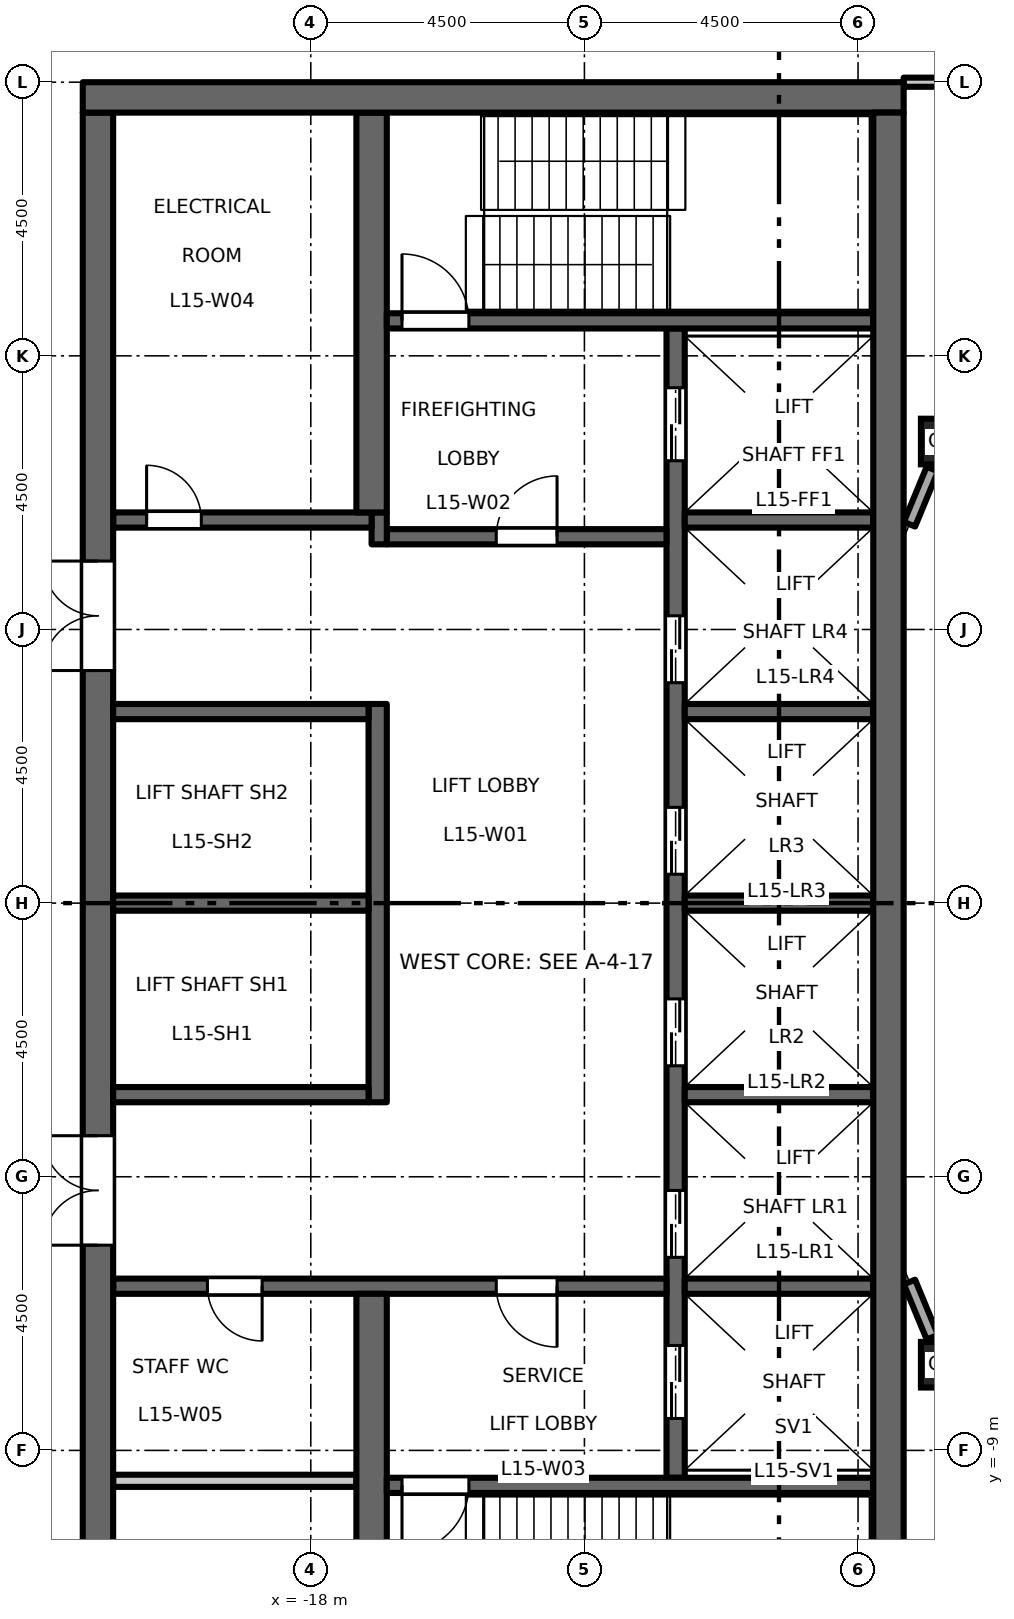
"""IFC4 building model, lengths in metres.
Left out: names, types, materials, properties, quantities, classifications, styles, units other than length and angle.
Written with IfcOpenShell. Run it as: python <this file> out.ifc"""

import sys

from ifc_helpers import new_model, si_unit, direction, frame, frame_2d, origin, origin_2d, place, context, subcontext, project, spatial, rectangle, hollow_rectangle, extrude, element, fill, save


model = new_model("IFC4")
c1 = context("Model", 3, precision=1e-05, world=origin(), true_north=direction((0.0, 1.0)))
c2 = subcontext(c1, "Body", "Model", "MODEL_VIEW")
j1 = project(units=[si_unit("LENGTHUNIT", "METRE"), si_unit("PLANEANGLEUNIT", "RADIAN")], contexts=[c1])
p1 = place(None, origin())
s1 = spatial("IfcSite", under=j1, at=p1, CompositionType="ELEMENT")
p2 = place(p1, origin())
s2 = spatial("IfcBuilding", under=s1, at=p2, CompositionType="ELEMENT")
p3 = place(p2, frame((0.0, 0.0, 71.7)))
s3 = spatial("IfcBuildingStorey", under=s2, at=p3, CompositionType="ELEMENT", Elevation=71.7)
for number, where, z_axis, x_axis in (
    (1, (-7.591, -7.591, 0.0), (0.0, 0.0, 1.0), (1.0, 0.0, 0.0)),
    (2, (-7.591, 7.591, 0.0), (0.0, 0.0, 1.0), (1.0, 0.0, 0.0)),
):
    element("IfcColumn", number, at=place(p3, frame(where, z_axis=z_axis, x_axis=x_axis)), inside=s3, PredefinedType="COLUMN", context=c2, shape_type="SweptSolid", body=[
        extrude(hollow_rectangle(XDim=0.75, YDim=0.75, WallThickness=0.045, at=origin_2d()), origin(), (0.0, 0.0, 1.0), 4.5),
    ])
p4 = place(p3, frame((-12.0, -9.45, 0.0), z_axis=(0.0, 0.0, 1.0), x_axis=(0.0, 1.0, 0.0)))
e3 = element("IfcWall", 3, at=p4, inside=s3, PredefinedType="SHEAR", context=c2, shape_type="SweptSolid", body=[
    extrude(rectangle(XDim=18.9, YDim=0.3, at=frame_2d((9.45, 0.0))), origin(), (0.0, 0.0, 1.0), 4.35),
])
p5 = place(p4, frame((3.625, 0.0, 0.0)))
e4 = element("IfcOpeningElement", 4, at=p5, cuts=e3, PredefinedType="OPENING", context=c2, shape_type="SweptSolid", body=[
    extrude(rectangle(XDim=1.1, YDim=2.1, at=frame_2d((0.55, 1.05))), frame((0.0, 0.16, 0.0), z_axis=(0.0, -1.0, 0.0), x_axis=(1.0, 0.0, 0.0)), (0.0, 0.0, 1.0), 0.32),
])
p6 = place(p4, frame((6.775, 0.0, 0.0)))
e5 = element("IfcOpeningElement", 5, at=p6, cuts=e3, PredefinedType="OPENING", context=c2, shape_type="SweptSolid", body=[
    extrude(rectangle(XDim=1.1, YDim=2.1, at=frame_2d((0.55, 1.05))), frame((0.0, 0.16, 0.0), z_axis=(0.0, -1.0, 0.0), x_axis=(1.0, 0.0, 0.0)), (0.0, 0.0, 1.0), 0.32),
])
p7 = place(p4, frame((9.925, 0.0, 0.0)))
e6 = element("IfcOpeningElement", 6, at=p7, cuts=e3, PredefinedType="OPENING", context=c2, shape_type="SweptSolid", body=[
    extrude(rectangle(XDim=1.1, YDim=2.1, at=frame_2d((0.55, 1.05))), frame((0.0, 0.16, 0.0), z_axis=(0.0, -1.0, 0.0), x_axis=(1.0, 0.0, 0.0)), (0.0, 0.0, 1.0), 0.32),
])
p8 = place(p4, frame((13.075, 0.0, 0.0)))
e7 = element("IfcOpeningElement", 7, at=p8, cuts=e3, PredefinedType="OPENING", context=c2, shape_type="SweptSolid", body=[
    extrude(rectangle(XDim=1.1, YDim=2.1, at=frame_2d((0.55, 1.05))), frame((0.0, 0.16, 0.0), z_axis=(0.0, -1.0, 0.0), x_axis=(1.0, 0.0, 0.0)), (0.0, 0.0, 1.0), 0.32),
])
p9 = place(p4, frame((16.725, 0.0, 0.0)))
e8 = element("IfcOpeningElement", 8, at=p9, cuts=e3, PredefinedType="OPENING", context=c2, shape_type="SweptSolid", body=[
    extrude(rectangle(XDim=1.2, YDim=2.1, at=frame_2d((0.6, 1.05))), frame((0.0, 0.16, 0.0), z_axis=(0.0, -1.0, 0.0), x_axis=(1.0, 0.0, 0.0)), (0.0, 0.0, 1.0), 0.32),
])
p10 = place(p4, frame((0.975, 0.0, 0.0)))
e9 = element("IfcOpeningElement", 9, at=p10, cuts=e3, PredefinedType="OPENING", context=c2, shape_type="SweptSolid", body=[
    extrude(rectangle(XDim=1.2, YDim=2.1, at=frame_2d((0.6, 1.05))), frame((0.0, 0.16, 0.0), z_axis=(0.0, -1.0, 0.0), x_axis=(1.0, 0.0, 0.0)), (0.0, 0.0, 1.0), 0.32),
])
p11 = place(p3, frame((-12.15, 6.025, 0.0), z_axis=(0.0, 0.0, 1.0), x_axis=(-1.0, 0.0, 0.0)))
e10 = element("IfcWall", 10, at=p11, inside=s3, PredefinedType="SHEAR", context=c2, shape_type="SweptSolid", body=[
    extrude(rectangle(XDim=4.6, YDim=0.25, at=frame_2d((2.3, 0.0))), origin(), (0.0, 0.0, 1.0), 4.35),
])
p12 = place(p11, frame((1.8, 0.0, 0.0)))
e11 = element("IfcOpeningElement", 11, at=p12, cuts=e10, PredefinedType="OPENING", context=c2, shape_type="SweptSolid", body=[
    extrude(rectangle(XDim=1.0, YDim=2.1, at=frame_2d((0.5, 1.05))), frame((0.0, 0.135, 0.0), z_axis=(0.0, -1.0, 0.0), x_axis=(1.0, 0.0, 0.0)), (0.0, 0.0, 1.0), 0.27),
])
p13 = place(p3, frame((-16.875, 5.9, 0.0), z_axis=(0.0, 0.0, 1.0), x_axis=(0.0, 1.0, 0.0)))
e12 = element("IfcWall", 12, at=p13, inside=s3, PredefinedType="SHEAR", context=c2, shape_type="SweptSolid", body=[
    extrude(rectangle(XDim=0.525, YDim=0.25, at=frame_2d((0.263, 0.0))), origin(), (0.0, 0.0, 1.0), 4.35),
])
p14 = place(p3, frame((-17.0, 6.3, 0.0), z_axis=(0.0, 0.0, 1.0), x_axis=(-1.0, 0.0, 0.0)))
e13 = element("IfcWall", 13, at=p14, inside=s3, PredefinedType="SHEAR", context=c2, shape_type="SweptSolid", body=[
    extrude(rectangle(XDim=4.25, YDim=0.25, at=frame_2d((2.125, 0.0))), origin(), (0.0, 0.0, 1.0), 4.35),
])
p15 = place(p14, frame((2.8, 0.0, 0.0)))
e14 = element("IfcOpeningElement", 14, at=p15, cuts=e13, PredefinedType="OPENING", context=c2, shape_type="SweptSolid", body=[
    extrude(rectangle(XDim=0.9, YDim=2.1, at=frame_2d((0.45, 1.05))), frame((0.0, 0.135, 0.0), z_axis=(0.0, -1.0, 0.0), x_axis=(1.0, 0.0, 0.0)), (0.0, 0.0, 1.0), 0.27),
])
p16 = place(p3, frame((-12.15, -6.3, 0.0), z_axis=(0.0, 0.0, 1.0), x_axis=(-1.0, 0.0, 0.0)))
e15 = element("IfcWall", 15, at=p16, inside=s3, PredefinedType="SHEAR", context=c2, shape_type="SweptSolid", body=[
    extrude(rectangle(XDim=9.1, YDim=0.25, at=frame_2d((4.55, 0.0))), origin(), (0.0, 0.0, 1.0), 4.35),
])
p17 = place(p16, frame((1.8, 0.0, 0.0)))
e16 = element("IfcOpeningElement", 16, at=p17, cuts=e15, PredefinedType="OPENING", context=c2, shape_type="SweptSolid", body=[
    extrude(rectangle(XDim=1.0, YDim=2.1, at=frame_2d((0.5, 1.05))), frame((0.0, 0.135, 0.0), z_axis=(0.0, -1.0, 0.0), x_axis=(1.0, 0.0, 0.0)), (0.0, 0.0, 1.0), 0.27),
])
p18 = place(p16, frame((6.65, 0.0, 0.0)))
e17 = element("IfcOpeningElement", 17, at=p18, cuts=e15, PredefinedType="OPENING", context=c2, shape_type="SweptSolid", body=[
    extrude(rectangle(XDim=0.9, YDim=2.1, at=frame_2d((0.45, 1.05))), frame((0.0, 0.135, 0.0), z_axis=(0.0, -1.0, 0.0), x_axis=(1.0, 0.0, 0.0)), (0.0, 0.0, 1.0), 0.27),
])
p19 = place(p3, frame((-21.5, -13.0, 0.0), z_axis=(0.0, 0.0, 1.0), x_axis=(0.0, 1.0, 0.0)))
e18 = element("IfcWall", 18, at=p19, inside=s3, PredefinedType="SHEAR", context=c2, shape_type="SweptSolid", body=[
    extrude(rectangle(XDim=26.0, YDim=0.5, at=frame_2d((13.0, 0.0))), origin(), (0.0, 0.0, 1.0), 4.35),
])
p20 = place(p19, frame((16.825, 0.0, 0.0)))
e19 = element("IfcOpeningElement", 19, at=p20, cuts=e18, PredefinedType="OPENING", context=c2, shape_type="SweptSolid", body=[
    extrude(rectangle(XDim=1.8, YDim=2.1, at=frame_2d((0.9, 1.05))), frame((0.0, 0.26, 0.0), z_axis=(0.0, -1.0, 0.0), x_axis=(1.0, 0.0, 0.0)), (0.0, 0.0, 1.0), 0.52),
])
p21 = place(p19, frame((7.375, 0.0, 0.0)))
e20 = element("IfcOpeningElement", 20, at=p21, cuts=e18, PredefinedType="OPENING", context=c2, shape_type="SweptSolid", body=[
    extrude(rectangle(XDim=1.8, YDim=2.1, at=frame_2d((0.9, 1.05))), frame((0.0, 0.26, 0.0), z_axis=(0.0, -1.0, 0.0), x_axis=(1.0, 0.0, 0.0)), (0.0, 0.0, 1.0), 0.52),
])
p22 = place(p19, frame((1.3, 0.0, 0.0)))
e21 = element("IfcOpeningElement", 21, at=p22, cuts=e18, PredefinedType="OPENING", context=c2, shape_type="SweptSolid", body=[
    extrude(rectangle(XDim=0.9, YDim=2.1, at=frame_2d((0.45, 1.05))), frame((0.0, 0.26, 0.0), z_axis=(0.0, -1.0, 0.0), x_axis=(1.0, 0.0, 0.0)), (0.0, 0.0, 1.0), 0.52),
])
p23 = place(p3, frame((-17.25, -9.5, 0.0), z_axis=(0.0, 0.0, 1.0), x_axis=(-1.0, 0.0, 0.0)))
e22 = element("IfcWall", 22, at=p23, inside=s3, PredefinedType="PARTITIONING", context=c2, shape_type="SweptSolid", body=[
    extrude(rectangle(XDim=4.0, YDim=0.2, at=frame_2d((2.0, 0.0))), origin(), (0.0, 0.0, 1.0), 4.35),
])
p24 = place(p3, frame((-16.9, -3.275, 0.0), z_axis=(0.0, 0.0, 1.0), x_axis=(0.0, 1.0, 0.0)))
e23 = element("IfcWall", 23, at=p24, inside=s3, PredefinedType="SHEAR", context=c2, shape_type="SweptSolid", body=[
    extrude(rectangle(XDim=6.55, YDim=0.3, at=frame_2d((3.275, 0.0))), origin(), (0.0, 0.0, 1.0), 4.35),
])
for number, where, z_axis, x_axis in (
    (24, (-17.05, 0.0, 0.0), (0.0, 0.0, 1.0), (-1.0, 0.0, 0.0)),
    (25, (-17.05, 3.15, 0.0), (0.0, 0.0, 1.0), (-1.0, 0.0, 0.0)),
    (26, (-17.05, -3.15, 0.0), (0.0, 0.0, 1.0), (-1.0, 0.0, 0.0)),
):
    element("IfcWall", number, at=place(p3, frame(where, z_axis=z_axis, x_axis=x_axis)), inside=s3, PredefinedType="SHEAR", context=c2, shape_type="SweptSolid", body=[
        extrude(rectangle(XDim=4.2, YDim=0.25, at=frame_2d((2.1, 0.0))), origin(), (0.0, 0.0, 1.0), 4.35),
    ])
for number, where, z_axis, x_axis in (
    (27, (-17.0, 6.425, 0.0), (0.0, 0.0, 1.0), (0.0, 1.0, 0.0)),
    (28, (-17.0, -13.0, 0.0), (0.0, 0.0, 1.0), (0.0, 1.0, 0.0)),
):
    element("IfcWall", number, at=place(p3, frame(where, z_axis=z_axis, x_axis=x_axis)), inside=s3, PredefinedType="SHEAR", context=c2, shape_type="SweptSolid", body=[
        extrude(rectangle(XDim=6.575, YDim=0.5, at=frame_2d((3.288, 0.0))), origin(), (0.0, 0.0, 1.0), 4.35),
    ])
for number, where, z_axis, x_axis in (
    (29, (-8.75, 0.0, 0.0), (0.0, 0.0, 1.0), (-1.0, 0.0, 0.0)),
    (30, (-8.75, 3.15, 0.0), (0.0, 0.0, 1.0), (-1.0, 0.0, 0.0)),
    (31, (-8.75, 6.3, 0.0), (0.0, 0.0, 1.0), (-1.0, 0.0, 0.0)),
    (32, (-8.75, -3.15, 0.0), (0.0, 0.0, 1.0), (-1.0, 0.0, 0.0)),
    (33, (-8.75, -6.3, 0.0), (0.0, 0.0, 1.0), (-1.0, 0.0, 0.0)),
):
    element("IfcWall", number, at=place(p3, frame(where, z_axis=z_axis, x_axis=x_axis)), inside=s3, PredefinedType="SHEAR", context=c2, shape_type="SweptSolid", body=[
        extrude(rectangle(XDim=3.1, YDim=0.25, at=frame_2d((1.55, 0.0))), origin(), (0.0, 0.0, 1.0), 4.35),
    ])
p25 = place(p3, frame((-8.75, 9.575, 0.0), z_axis=(0.0, 0.0, 1.0), x_axis=(-1.0, 0.0, 0.0)))
e34 = element("IfcWall", 34, at=p25, inside=s3, PredefinedType="SHEAR", context=c2, shape_type="SweptSolid", body=[
    extrude(rectangle(XDim=8.0, YDim=0.25, at=frame_2d((4.0, 0.0))), origin(), (0.0, 0.0, 1.0), 4.35),
])
p26 = place(p25, frame((6.65, 0.0, 0.0)))
e35 = element("IfcOpeningElement", 35, at=p26, cuts=e34, PredefinedType="OPENING", context=c2, shape_type="SweptSolid", body=[
    extrude(rectangle(XDim=1.1, YDim=2.1, at=frame_2d((0.55, 1.05))), frame((0.0, 0.135, 0.0), z_axis=(0.0, -1.0, 0.0), x_axis=(1.0, 0.0, 0.0)), (0.0, 0.0, 1.0), 0.27),
])
p27 = place(p3, frame((-8.75, -9.575, 0.0), z_axis=(0.0, 0.0, 1.0), x_axis=(-1.0, 0.0, 0.0)))
e36 = element("IfcWall", 36, at=p27, inside=s3, PredefinedType="SHEAR", context=c2, shape_type="SweptSolid", body=[
    extrude(rectangle(XDim=8.0, YDim=0.25, at=frame_2d((4.0, 0.0))), origin(), (0.0, 0.0, 1.0), 4.35),
])
p28 = place(p27, frame((6.65, 0.0, 0.0)))
e37 = element("IfcOpeningElement", 37, at=p28, cuts=e36, PredefinedType="OPENING", context=c2, shape_type="SweptSolid", body=[
    extrude(rectangle(XDim=1.1, YDim=2.1, at=frame_2d((0.55, 1.05))), frame((0.0, 0.135, 0.0), z_axis=(0.0, -1.0, 0.0), x_axis=(1.0, 0.0, 0.0)), (0.0, 0.0, 1.0), 0.27),
])
p29 = place(p3, frame((-8.25, 13.25, 0.0), z_axis=(0.0, 0.0, 1.0), x_axis=(-1.0, 0.0, 0.0)))
e38 = element("IfcWall", 38, at=p29, inside=s3, PredefinedType="SHEAR", context=c2, shape_type="SweptSolid", body=[
    extrude(rectangle(XDim=13.5, YDim=0.5, at=frame_2d((6.75, 0.0))), origin(), (0.0, 0.0, 1.0), 4.35),
])
p30 = place(p3, frame((-8.5, -13.0, 0.0), z_axis=(0.0, 0.0, 1.0), x_axis=(0.0, 1.0, 0.0)))
e39 = element("IfcWall", 39, at=p30, inside=s3, PredefinedType="SHEAR", context=c2, shape_type="SweptSolid", body=[
    extrude(rectangle(XDim=26.0, YDim=0.5, at=frame_2d((13.0, 0.0))), origin(), (0.0, 0.0, 1.0), 4.35),
])
for number, where, z_axis, x_axis in (
    (40, (-7.779, 7.138, 0.0), (0.0, 0.0, 1.0), (-0.383, -0.924, 0.0)),
    (41, (-8.154, -6.231, 0.0), (0.0, 0.0, 1.0), (0.383, -0.924, 0.0)),
):
    element("IfcWall", number, at=place(p3, frame(where, z_axis=z_axis, x_axis=x_axis)), inside=s3, PredefinedType="STANDARD", context=c2, shape_type="SweptSolid", body=[
        extrude(rectangle(XDim=0.982, YDim=0.2, at=frame_2d((0.491, 0.0))), origin(), (0.0, 0.0, 1.0), 3.73),
    ])
p31 = place(p3, frame((-8.25, 13.5, 0.0), z_axis=(0.0, 0.0, 1.0), x_axis=(1.0, 0.0, 0.0)))
e42 = element("IfcWall", 42, at=p31, inside=s3, PredefinedType="PARTITIONING", context=c2, shape_type="SweptSolid", body=[
    extrude(rectangle(XDim=16.5, YDim=0.15, at=frame_2d((8.25, 0.0))), origin(), (0.0, 0.0, 1.0), 3.85),
])
p32 = place(p31, frame((1.4, 0.0, 0.0)))
e43 = element("IfcOpeningElement", 43, at=p32, cuts=e42, PredefinedType="OPENING", context=c2, shape_type="SweptSolid", body=[
    extrude(rectangle(XDim=1.0, YDim=2.1, at=frame_2d((0.5, 1.05))), frame((0.0, 0.085, 0.0), z_axis=(0.0, -1.0, 0.0), x_axis=(1.0, 0.0, 0.0)), (0.0, 0.0, 1.0), 0.17),
])
p33 = place(p31, frame((9.65, 0.0, 0.0)))
e44 = element("IfcOpeningElement", 44, at=p33, cuts=e42, PredefinedType="OPENING", context=c2, shape_type="SweptSolid", body=[
    extrude(rectangle(XDim=1.0, YDim=2.1, at=frame_2d((0.5, 1.05))), frame((0.0, 0.085, 0.0), z_axis=(0.0, -1.0, 0.0), x_axis=(1.0, 0.0, 0.0)), (0.0, 0.0, 1.0), 0.17),
])
p34 = place(p12, origin())
e45 = element("IfcDoor", 45, at=p34, inside=s3, OperationType="SINGLE_SWING_LEFT", PredefinedType="DOOR", context=c2, shape_type="SweptSolid", body=[
    extrude(rectangle(XDim=1.0, YDim=2.1, at=frame_2d((0.5, 1.05))), frame((0.0, 0.025, 0.0), z_axis=(0.0, -1.0, 0.0), x_axis=(1.0, 0.0, 0.0)), (0.0, 0.0, 1.0), 0.05),
])
fill(e11, e45)
p35 = place(p17, origin())
e46 = element("IfcDoor", 46, at=p35, inside=s3, OperationType="SINGLE_SWING_RIGHT", PredefinedType="DOOR", context=c2, shape_type="SweptSolid", body=[
    extrude(rectangle(XDim=1.0, YDim=2.1, at=frame_2d((0.5, 1.05))), frame((0.0, 0.025, 0.0), z_axis=(0.0, -1.0, 0.0), x_axis=(1.0, 0.0, 0.0)), (0.0, 0.0, 1.0), 0.05),
])
fill(e16, e46)
p36 = place(p26, origin())
e47 = element("IfcDoor", 47, at=p36, inside=s3, OperationType="SINGLE_SWING_RIGHT", PredefinedType="DOOR", context=c2, shape_type="SweptSolid", body=[
    extrude(rectangle(XDim=1.1, YDim=2.1, at=frame_2d((0.55, 1.05))), frame((0.0, 0.025, 0.0), z_axis=(0.0, -1.0, 0.0), x_axis=(1.0, 0.0, 0.0)), (0.0, 0.0, 1.0), 0.05),
])
fill(e35, e47)
p37 = place(p28, origin())
e48 = element("IfcDoor", 48, at=p37, inside=s3, OperationType="SINGLE_SWING_LEFT", PredefinedType="DOOR", context=c2, shape_type="SweptSolid", body=[
    extrude(rectangle(XDim=1.1, YDim=2.1, at=frame_2d((0.55, 1.05))), frame((0.0, 0.025, 0.0), z_axis=(0.0, -1.0, 0.0), x_axis=(1.0, 0.0, 0.0)), (0.0, 0.0, 1.0), 0.05),
])
fill(e37, e48)
p38 = place(p20, origin())
e49 = element("IfcDoor", 49, at=p38, inside=s3, OperationType="DOUBLE_DOOR_DOUBLE_SWING", PredefinedType="DOOR", context=c2, shape_type="SweptSolid", body=[
    extrude(rectangle(XDim=1.8, YDim=2.1, at=frame_2d((0.9, 1.05))), frame((0.0, 0.025, 0.0), z_axis=(0.0, -1.0, 0.0), x_axis=(1.0, 0.0, 0.0)), (0.0, 0.0, 1.0), 0.05),
])
fill(e19, e49)
p39 = place(p21, origin())
e50 = element("IfcDoor", 50, at=p39, inside=s3, OperationType="DOUBLE_DOOR_DOUBLE_SWING", PredefinedType="DOOR", context=c2, shape_type="SweptSolid", body=[
    extrude(rectangle(XDim=1.8, YDim=2.1, at=frame_2d((0.9, 1.05))), frame((0.0, 0.025, 0.0), z_axis=(0.0, -1.0, 0.0), x_axis=(1.0, 0.0, 0.0)), (0.0, 0.0, 1.0), 0.05),
])
fill(e20, e50)
p40 = place(p5, origin())
e51 = element("IfcDoor", 51, at=p40, inside=s3, OperationType="DOUBLE_DOOR_SLIDING", PredefinedType="DOOR", context=c2, shape_type="SweptSolid", body=[
    extrude(rectangle(XDim=1.1, YDim=2.1, at=frame_2d((0.55, 1.05))), frame((0.0, 0.025, 0.0), z_axis=(0.0, -1.0, 0.0), x_axis=(1.0, 0.0, 0.0)), (0.0, 0.0, 1.0), 0.05),
])
fill(e4, e51)
p41 = place(p6, origin())
e52 = element("IfcDoor", 52, at=p41, inside=s3, OperationType="DOUBLE_DOOR_SLIDING", PredefinedType="DOOR", context=c2, shape_type="SweptSolid", body=[
    extrude(rectangle(XDim=1.1, YDim=2.1, at=frame_2d((0.55, 1.05))), frame((0.0, 0.025, 0.0), z_axis=(0.0, -1.0, 0.0), x_axis=(1.0, 0.0, 0.0)), (0.0, 0.0, 1.0), 0.05),
])
fill(e5, e52)
p42 = place(p7, origin())
e53 = element("IfcDoor", 53, at=p42, inside=s3, OperationType="DOUBLE_DOOR_SLIDING", PredefinedType="DOOR", context=c2, shape_type="SweptSolid", body=[
    extrude(rectangle(XDim=1.1, YDim=2.1, at=frame_2d((0.55, 1.05))), frame((0.0, 0.025, 0.0), z_axis=(0.0, -1.0, 0.0), x_axis=(1.0, 0.0, 0.0)), (0.0, 0.0, 1.0), 0.05),
])
fill(e6, e53)
p43 = place(p8, origin())
e54 = element("IfcDoor", 54, at=p43, inside=s3, OperationType="DOUBLE_DOOR_SLIDING", PredefinedType="DOOR", context=c2, shape_type="SweptSolid", body=[
    extrude(rectangle(XDim=1.1, YDim=2.1, at=frame_2d((0.55, 1.05))), frame((0.0, 0.025, 0.0), z_axis=(0.0, -1.0, 0.0), x_axis=(1.0, 0.0, 0.0)), (0.0, 0.0, 1.0), 0.05),
])
fill(e7, e54)
p44 = place(p9, origin())
e55 = element("IfcDoor", 55, at=p44, inside=s3, OperationType="DOUBLE_DOOR_SLIDING", PredefinedType="DOOR", context=c2, shape_type="SweptSolid", body=[
    extrude(rectangle(XDim=1.2, YDim=2.1, at=frame_2d((0.6, 1.05))), frame((0.0, 0.025, 0.0), z_axis=(0.0, -1.0, 0.0), x_axis=(1.0, 0.0, 0.0)), (0.0, 0.0, 1.0), 0.05),
])
fill(e8, e55)
p45 = place(p10, origin())
e56 = element("IfcDoor", 56, at=p45, inside=s3, OperationType="DOUBLE_DOOR_SLIDING", PredefinedType="DOOR", context=c2, shape_type="SweptSolid", body=[
    extrude(rectangle(XDim=1.2, YDim=2.1, at=frame_2d((0.6, 1.05))), frame((0.0, 0.025, 0.0), z_axis=(0.0, -1.0, 0.0), x_axis=(1.0, 0.0, 0.0)), (0.0, 0.0, 1.0), 0.05),
])
fill(e9, e56)
p46 = place(p15, origin())
e57 = element("IfcDoor", 57, at=p46, inside=s3, OperationType="SINGLE_SWING_RIGHT", PredefinedType="DOOR", context=c2, shape_type="SweptSolid", body=[
    extrude(rectangle(XDim=0.9, YDim=2.1, at=frame_2d((0.45, 1.05))), frame((0.0, 0.025, 0.0), z_axis=(0.0, -1.0, 0.0), x_axis=(1.0, 0.0, 0.0)), (0.0, 0.0, 1.0), 0.05),
])
fill(e14, e57)
p47 = place(p18, origin())
e58 = element("IfcDoor", 58, at=p47, inside=s3, OperationType="SINGLE_SWING_RIGHT", PredefinedType="DOOR", context=c2, shape_type="SweptSolid", body=[
    extrude(rectangle(XDim=0.9, YDim=2.1, at=frame_2d((0.45, 1.05))), frame((0.0, 0.025, 0.0), z_axis=(0.0, -1.0, 0.0), x_axis=(1.0, 0.0, 0.0)), (0.0, 0.0, 1.0), 0.05),
])
fill(e17, e58)
save(model, sys.argv[1])
